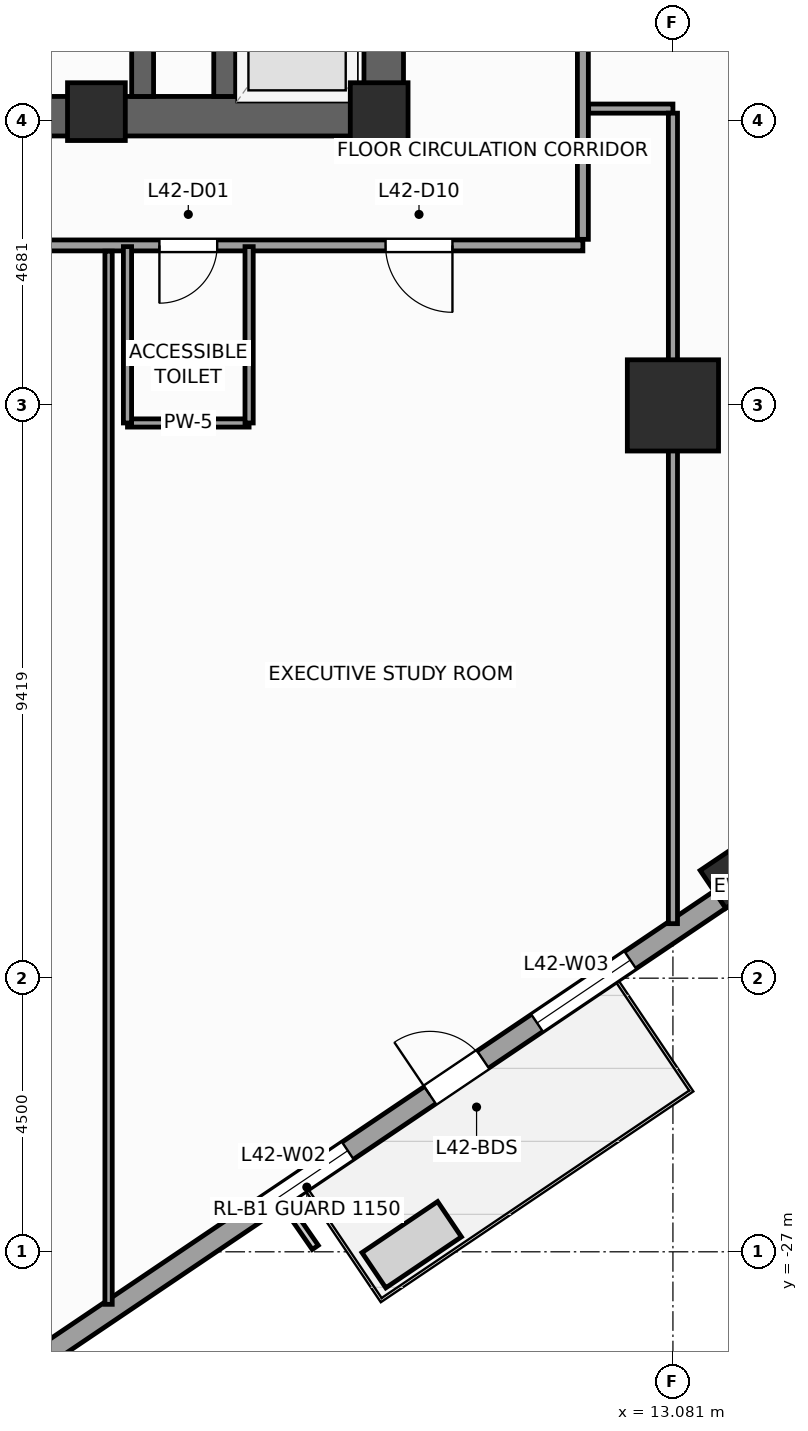
"""IFC4 building model, lengths in metres.
Left out: names, types, materials, properties, quantities, classifications, styles, units other than length and angle.
Written with IfcOpenShell. Run it as: python <this file> out.ifc"""

import sys

from ifc_helpers import new_model, si_unit, direction, frame, frame_2d, origin, origin_2d, place, context, subcontext, project, spatial, rectangle, extrude, source, transform, mapped, element, fill, save


model = new_model("IFC4")
c1 = context("Model", 3, precision=1e-05, world=origin(), true_north=direction((0.0, 1.0)))
c2 = subcontext(c1, "Body", "Model", "MODEL_VIEW")
j1 = project(units=[si_unit("LENGTHUNIT", "METRE"), si_unit("PLANEANGLEUNIT", "RADIAN")], contexts=[c1])
p1 = place(None, origin())
s1 = spatial("IfcSite", under=j1, at=p1, CompositionType="ELEMENT")
p2 = place(p1, origin())
s2 = spatial("IfcBuilding", under=s1, at=p2, CompositionType="ELEMENT")
p3 = place(p2, frame((0.0, 0.0, 176.4)))
s3 = spatial("IfcBuildingStorey", under=s2, at=p3, CompositionType="ELEMENT", Elevation=176.4)
p4 = place(p3, frame((-8.65, -8.325, 0.0), z_axis=(0.0, 0.0, 1.0), x_axis=(1.0, 0.0, 0.0)))
e1 = element("IfcWall", 1, at=p4, inside=s3, PredefinedType="SHEAR", context=c2, shape_type="SweptSolid", body=[
    extrude(rectangle(XDim=17.3, YDim=0.65, at=frame_2d((8.65, 0.0))), origin(), (0.0, 0.0, 1.0), 4.0),
])
p5 = place(p4, frame((8.0, 0.0, 0.0)))
e2 = element("IfcOpeningElement", 2, at=p5, cuts=e1, PredefinedType="OPENING", context=c2, shape_type="SweptSolid", body=[
    extrude(rectangle(XDim=1.3, YDim=2.2, at=frame_2d((0.65, 1.1))), frame((0.0, 0.335, 0.0), z_axis=(0.0, -1.0, 0.0), x_axis=(1.0, 0.0, 0.0)), (0.0, 0.0, 1.0), 0.67),
])
p6 = place(p3, frame((8.325, -8.0, 0.0), z_axis=(0.0, 0.0, 1.0), x_axis=(0.0, 1.0, 0.0)))
e3 = element("IfcWall", 3, at=p6, inside=s3, PredefinedType="SHEAR", context=c2, shape_type="SweptSolid", body=[
    extrude(rectangle(XDim=16.0, YDim=0.65, at=frame_2d((8.0, 0.0))), origin(), (0.0, 0.0, 1.0), 4.0),
])
p7 = place(p6, frame((4.69, 0.0, 0.0)))
e4 = element("IfcOpeningElement", 4, at=p7, cuts=e3, PredefinedType="OPENING", context=c2, shape_type="SweptSolid", body=[
    extrude(rectangle(XDim=1.3, YDim=2.2, at=frame_2d((0.65, 1.1))), frame((0.0, 0.335, 0.0), z_axis=(0.0, -1.0, 0.0), x_axis=(1.0, 0.0, 0.0)), (0.0, 0.0, 1.0), 0.67),
])
p8 = place(p3, frame((4.36, -8.0, 0.0), z_axis=(0.0, 0.0, 1.0), x_axis=(0.0, 1.0, 0.0)))
e5 = element("IfcWall", 5, at=p8, inside=s3, PredefinedType="SHEAR", context=c2, shape_type="SweptSolid", body=[
    extrude(rectangle(XDim=16.0, YDim=0.36, at=frame_2d((8.0, 0.0))), origin(), (0.0, 0.0, 1.0), 4.0),
])
p9 = place(p3, frame((5.71, -8.0, 0.0), z_axis=(0.0, 0.0, 1.0), x_axis=(0.0, 1.0, 0.0)))
e6 = element("IfcWall", 6, at=p9, inside=s3, PredefinedType="SHEAR", context=c2, shape_type="SweptSolid", body=[
    extrude(rectangle(XDim=2.54, YDim=0.36, at=frame_2d((1.27, 0.0))), origin(), (0.0, 0.0, 1.0), 4.0),
])
m1 = source(origin(), c2, "Body", "SweptSolid", [
    extrude(rectangle(XDim=0.95, YDim=0.95, at=origin_2d()), origin(), (0.0, 0.0, 1.0), 4.0),
])
for number, where, z_axis, x_axis in (
    (7, (8.25, -8.25, 0.0), (0.0, 0.0, 1.0), (1.0, 0.0, 0.0)),
    (8, (3.6, -8.25, 0.0), (0.0, 0.0, 1.0), (1.0, 0.0, 0.0)),
):
    element("IfcColumn", number, at=place(p3, frame(where, z_axis=z_axis, x_axis=x_axis)), inside=s3, PredefinedType="PILASTER", context=c2, shape_type="MappedRepresentation", body=[
        mapped(m1, transform((0.0, 0.0, 0.0), scale=1.0)),
    ])
m2 = source(origin(), c2, "Body", "SweptSolid", [
    extrude(rectangle(XDim=1.5, YDim=1.5, at=origin_2d()), origin(), (0.0, 0.0, 1.0), 4.0),
])
p10 = place(p3, frame((13.081, -13.081, 0.0), z_axis=(0.0, 0.0, 1.0), x_axis=(1.0, 0.0, 0.0)))
e9 = element("IfcColumn", 9, at=p10, inside=s3, PredefinedType="COLUMN", context=c2, shape_type="MappedRepresentation", body=[
    mapped(m2, transform((0.0, 0.0, 0.0), scale=1.0)),
])
m3 = source(origin(), c2, "Body", "SweptSolid", [
    extrude(rectangle(XDim=0.75, YDim=0.75, at=origin_2d()), origin(), (0.0, 0.0, 1.0), 4.0),
])
p11 = place(p3, frame((14.05, -20.83, 0.0), z_axis=(0.0, 0.0, 1.0), x_axis=(0.829037572555, 0.559192903471, 0.0)))
e10 = element("IfcColumn", 10, at=p11, inside=s3, PredefinedType="COLUMN", context=c2, shape_type="MappedRepresentation", body=[
    mapped(m3, transform((0.0, 0.0, 0.0), scale=1.0)),
])
p12 = place(p3, frame((-2.972, -32.558, 0.0), z_axis=(0.0, 0.0, 1.0), x_axis=(0.829036218961, 0.559194910251, 0.0)))
e11 = element("IfcWall", 11, at=p12, inside=s3, PredefinedType="STANDARD", context=c2, shape_type="SweptSolid", body=[
    extrude(rectangle(XDim=41.34, YDim=0.34, at=frame_2d((20.67, 0.0))), origin(), (0.0, 0.0, 1.0), 3.04),
])
p13 = place(p12, frame((14.545, 0.0, 0.0)))
e12 = element("IfcOpeningElement", 12, at=p13, cuts=e11, PredefinedType="OPENING", context=c2, shape_type="SweptSolid", body=[
    extrude(rectangle(XDim=1.05, YDim=2.25, at=frame_2d((0.525, 1.125))), frame((0.0, 0.18, 0.0), z_axis=(0.0, -1.0, 0.0), x_axis=(1.0, 0.0, 0.0)), (0.0, 0.0, 1.0), 0.36),
])
p14 = place(p12, frame((4.261, 0.0, 0.56)))
e13 = element("IfcOpeningElement", 13, at=p14, cuts=e11, PredefinedType="OPENING", context=c2, shape_type="SweptSolid", body=[
    extrude(rectangle(XDim=1.4, YDim=2.4, at=frame_2d((0.7, 1.2))), frame((0.0, 0.18, 0.0), z_axis=(0.0, -1.0, 0.0), x_axis=(1.0, 0.0, 0.0)), (0.0, 0.0, 1.0), 0.36),
])
p15 = place(p12, frame((11.064, 0.0, 0.61)))
e14 = element("IfcOpeningElement", 14, at=p15, cuts=e11, PredefinedType="OPENING", context=c2, shape_type="SweptSolid", body=[
    extrude(rectangle(XDim=1.85, YDim=2.35, at=frame_2d((0.925, 1.175))), frame((0.0, 0.18, 0.0), z_axis=(0.0, -1.0, 0.0), x_axis=(1.0, 0.0, 0.0)), (0.0, 0.0, 1.0), 0.36),
])
p16 = place(p12, frame((16.668, 0.0, 0.61)))
e15 = element("IfcOpeningElement", 15, at=p16, cuts=e11, PredefinedType="OPENING", context=c2, shape_type="SweptSolid", body=[
    extrude(rectangle(XDim=1.85, YDim=2.35, at=frame_2d((0.925, 1.175))), frame((0.0, 0.18, 0.0), z_axis=(0.0, -1.0, 0.0), x_axis=(1.0, 0.0, 0.0)), (0.0, 0.0, 1.0), 0.36),
])
p17 = place(p12, frame((27.186, 0.0, 0.61)))
e16 = element("IfcOpeningElement", 16, at=p17, cuts=e11, PredefinedType="OPENING", context=c2, shape_type="SweptSolid", body=[
    extrude(rectangle(XDim=1.85, YDim=2.35, at=frame_2d((0.925, 1.175))), frame((0.0, 0.18, 0.0), z_axis=(0.0, -1.0, 0.0), x_axis=(1.0, 0.0, 0.0)), (0.0, 0.0, 1.0), 0.36),
])
p18 = place(p12, frame((34.852, 0.0, 0.56)))
e17 = element("IfcOpeningElement", 17, at=p18, cuts=e11, PredefinedType="OPENING", context=c2, shape_type="SweptSolid", body=[
    extrude(rectangle(XDim=1.4, YDim=2.4, at=frame_2d((0.7, 1.2))), frame((0.0, 0.18, 0.0), z_axis=(0.0, -1.0, 0.0), x_axis=(1.0, 0.0, 0.0)), (0.0, 0.0, 1.0), 0.36),
])
p19 = place(p3, frame((-10.45, -10.45, 0.0), z_axis=(0.0, 0.0, 1.0), x_axis=(1.0, 0.0, 0.0)))
e18 = element("IfcWall", 18, at=p19, inside=s3, PredefinedType="PARTITIONING", context=c2, shape_type="SweptSolid", body=[
    extrude(rectangle(XDim=22.05, YDim=0.18, at=frame_2d((11.025, 0.0))), origin(), (0.0, 0.0, 1.0), 3.74),
])
p20 = place(p19, frame((15.086, 0.0, 0.0)))
e19 = element("IfcOpeningElement", 19, at=p20, cuts=e18, PredefinedType="OPENING", context=c2, shape_type="SweptSolid", body=[
    extrude(rectangle(XDim=0.95, YDim=2.1, at=frame_2d((0.475, 1.05))), frame((0.0, 0.1, 0.0), z_axis=(0.0, -1.0, 0.0), x_axis=(1.0, 0.0, 0.0)), (0.0, 0.0, 1.0), 0.2),
])
p21 = place(p19, frame((7.611, 0.0, 0.0)))
e20 = element("IfcOpeningElement", 20, at=p21, cuts=e18, PredefinedType="OPENING", context=c2, shape_type="SweptSolid", body=[
    extrude(rectangle(XDim=0.95, YDim=2.1, at=frame_2d((0.475, 1.05))), frame((0.0, 0.1, 0.0), z_axis=(0.0, -1.0, 0.0), x_axis=(1.0, 0.0, 0.0)), (0.0, 0.0, 1.0), 0.2),
])
p22 = place(p19, frame((2.939, 0.0, 0.0)))
e21 = element("IfcOpeningElement", 21, at=p22, cuts=e18, PredefinedType="OPENING", context=c2, shape_type="SweptSolid", body=[
    extrude(rectangle(XDim=1.1, YDim=2.2, at=frame_2d((0.55, 1.1))), frame((0.0, 0.1, 0.0), z_axis=(0.0, -1.0, 0.0), x_axis=(1.0, 0.0, 0.0)), (0.0, 0.0, 1.0), 0.2),
])
p23 = place(p19, frame((11.175, 0.0, 0.0)))
e22 = element("IfcOpeningElement", 22, at=p23, cuts=e18, PredefinedType="OPENING", context=c2, shape_type="SweptSolid", body=[
    extrude(rectangle(XDim=1.1, YDim=2.2, at=frame_2d((0.55, 1.1))), frame((0.0, 0.1, 0.0), z_axis=(0.0, -1.0, 0.0), x_axis=(1.0, 0.0, 0.0)), (0.0, 0.0, 1.0), 0.2),
])
p24 = place(p19, frame((18.805, 0.0, 0.0)))
e23 = element("IfcOpeningElement", 23, at=p24, cuts=e18, PredefinedType="OPENING", context=c2, shape_type="SweptSolid", body=[
    extrude(rectangle(XDim=1.1, YDim=2.2, at=frame_2d((0.55, 1.1))), frame((0.0, 0.1, 0.0), z_axis=(0.0, -1.0, 0.0), x_axis=(1.0, 0.0, 0.0)), (0.0, 0.0, 1.0), 0.2),
])
p25 = place(p3, frame((11.6, -10.35, 0.0), z_axis=(0.0, 0.0, 1.0), x_axis=(0.0, 1.0, 0.0)))
e24 = element("IfcWall", 24, at=p25, inside=s3, PredefinedType="PARTITIONING", context=c2, shape_type="SweptSolid", body=[
    extrude(rectangle(XDim=11.95, YDim=0.18, at=frame_2d((5.975, 0.0))), origin(), (0.0, 0.0, 1.0), 3.74),
])
p26 = place(p25, frame((9.911, 0.0, 0.0)))
e25 = element("IfcOpeningElement", 25, at=p26, cuts=e24, PredefinedType="OPENING", context=c2, shape_type="SweptSolid", body=[
    extrude(rectangle(XDim=1.1, YDim=2.2, at=frame_2d((0.55, 1.1))), frame((0.0, 0.1, 0.0), z_axis=(0.0, -1.0, 0.0), x_axis=(1.0, 0.0, 0.0)), (0.0, 0.0, 1.0), 0.2),
])
p27 = place(p25, frame((4.1, 0.0, 0.0)))
e26 = element("IfcOpeningElement", 26, at=p27, cuts=e24, PredefinedType="OPENING", context=c2, shape_type="SweptSolid", body=[
    extrude(rectangle(XDim=1.1, YDim=2.2, at=frame_2d((0.55, 1.1))), frame((0.0, 0.1, 0.0), z_axis=(0.0, -1.0, 0.0), x_axis=(1.0, 0.0, 0.0)), (0.0, 0.0, 1.0), 0.2),
])
p28 = place(p25, frame((7.675, 0.0, 0.0)))
e27 = element("IfcOpeningElement", 27, at=p28, cuts=e24, PredefinedType="OPENING", context=c2, shape_type="SweptSolid", body=[
    extrude(rectangle(XDim=1.1, YDim=2.2, at=frame_2d((0.55, 1.1))), frame((0.0, 0.1, 0.0), z_axis=(0.0, -1.0, 0.0), x_axis=(1.0, 0.0, 0.0)), (0.0, 0.0, 1.0), 0.2),
])
p29 = place(p3, frame((3.8, -27.864, 0.0), z_axis=(0.0, 0.0, 1.0), x_axis=(0.0, 1.0, 0.0)))
e28 = element("IfcWall", 28, at=p29, inside=s3, PredefinedType="PARTITIONING", context=c2, shape_type="SweptSolid", body=[
    extrude(rectangle(XDim=17.319, YDim=0.12, at=frame_2d((8.659, 0.0))), origin(), (0.0, 0.0, 1.0), 3.74),
])
p30 = place(p3, frame((11.695, -8.2, 0.0), z_axis=(0.0, 0.0, 1.0), x_axis=(1.0, 0.0, 0.0)))
e29 = element("IfcWall", 29, at=p30, inside=s3, PredefinedType="PARTITIONING", context=c2, shape_type="SweptSolid", body=[
    extrude(rectangle(XDim=1.386, YDim=0.15, at=frame_2d((0.693, 0.0))), origin(), (0.0, 0.0, 1.0), 3.74),
])
p31 = place(p3, frame((13.081, -8.275, 0.0), z_axis=(0.0, 0.0, 1.0), x_axis=(0.0, -1.0, 0.0)))
e30 = element("IfcWall", 30, at=p31, inside=s3, PredefinedType="PARTITIONING", context=c2, shape_type="SweptSolid", body=[
    extrude(rectangle(XDim=13.329, YDim=0.15, at=frame_2d((6.664, 0.0))), origin(), (0.0, 0.0, 1.0), 2.84),
])
p32 = place(p3, frame((4.111, -13.37, 0.0), z_axis=(0.0, 0.0, 1.0), x_axis=(1.0, 0.0, 0.0)))
e31 = element("IfcWall", 31, at=p32, inside=s3, PredefinedType="PARTITIONING", context=c2, shape_type="SweptSolid", body=[
    extrude(rectangle(XDim=2.0, YDim=0.135, at=frame_2d((1.0, 0.0))), origin(), (0.0, 0.0, 1.0), 2.84),
])
for number, where, z_axis, x_axis in (
    (32, (6.111, -13.37, 0.0), (0.0, 0.0, 1.0), (0.0, 1.0, 0.0)),
    (33, (4.111, -13.37, 0.0), (0.0, 0.0, 1.0), (0.0, 1.0, 0.0)),
):
    element("IfcWall", number, at=place(p3, frame(where, z_axis=z_axis, x_axis=x_axis)), inside=s3, PredefinedType="PARTITIONING", context=c2, shape_type="SweptSolid", body=[
        extrude(rectangle(XDim=2.9, YDim=0.135, at=frame_2d((1.45, 0.0))), origin(), (0.0, 0.0, 1.0), 3.74),
    ])
m4 = source(origin(), c2, "Body", "SweptSolid", [
    extrude(rectangle(XDim=1.05, YDim=2.25, at=frame_2d((0.525, 1.125))), frame((0.0, 0.025, 0.0), z_axis=(0.0, -1.0, 0.0), x_axis=(1.0, 0.0, 0.0)), (0.0, 0.0, 1.0), 0.05),
])
p33 = place(p13, origin())
e34 = element("IfcDoor", 34, at=p33, inside=s3, OperationType="SINGLE_SWING_LEFT", PredefinedType="DOOR", context=c2, shape_type="MappedRepresentation", body=[
    mapped(m4, transform((0.0, 0.0, 0.0), scale=1.0)),
])
fill(e12, e34)
m5 = source(origin(), c2, "Body", "SweptSolid", [
    extrude(rectangle(XDim=1.85, YDim=2.35, at=frame_2d((0.925, 1.175))), frame((0.0, 0.03, 0.0), z_axis=(0.0, -1.0, 0.0), x_axis=(1.0, 0.0, 0.0)), (0.0, 0.0, 1.0), 0.06),
])
p34 = place(p15, origin())
e35 = element("IfcWindow", 35, at=p34, inside=s3, PartitioningType="SINGLE_PANEL", PredefinedType="WINDOW", context=c2, shape_type="MappedRepresentation", body=[
    mapped(m5, transform((0.0, 0.0, 0.0), scale=1.0)),
])
fill(e14, e35)
p35 = place(p16, origin())
e36 = element("IfcWindow", 36, at=p35, inside=s3, PartitioningType="SINGLE_PANEL", PredefinedType="WINDOW", context=c2, shape_type="MappedRepresentation", body=[
    mapped(m5, transform((0.0, 0.0, 0.0), scale=1.0)),
])
fill(e15, e36)
m6 = source(origin(), c2, "Body", "SweptSolid", [
    extrude(rectangle(XDim=0.95, YDim=2.1, at=frame_2d((0.475, 1.05))), frame((0.0, 0.025, 0.0), z_axis=(0.0, -1.0, 0.0), x_axis=(1.0, 0.0, 0.0)), (0.0, 0.0, 1.0), 0.05),
])
p36 = place(p20, frame((0.95, 0.0, 0.0), z_axis=(0.0, 0.0, 1.0), x_axis=(-1.0, 0.0, 0.0)))
e37 = element("IfcDoor", 37, at=p36, inside=s3, OperationType="SINGLE_SWING_LEFT", PredefinedType="DOOR", context=c2, shape_type="MappedRepresentation", body=[
    mapped(m6, transform((0.0, 0.0, 0.0), scale=1.0)),
])
fill(e19, e37)
m7 = source(origin(), c2, "Body", "SweptSolid", [
    extrude(rectangle(XDim=1.1, YDim=2.2, at=frame_2d((0.55, 1.1))), frame((0.0, 0.025, 0.0), z_axis=(0.0, -1.0, 0.0), x_axis=(1.0, 0.0, 0.0)), (0.0, 0.0, 1.0), 0.05),
])
p37 = place(p24, frame((1.1, 0.0, 0.0), z_axis=(0.0, 0.0, 1.0), x_axis=(-1.0, 0.0, 0.0)))
e38 = element("IfcDoor", 38, at=p37, inside=s3, OperationType="SINGLE_SWING_RIGHT", PredefinedType="DOOR", context=c2, shape_type="MappedRepresentation", body=[
    mapped(m7, transform((0.0, 0.0, 0.0), scale=1.0)),
])
fill(e23, e38)
save(model, sys.argv[1])
